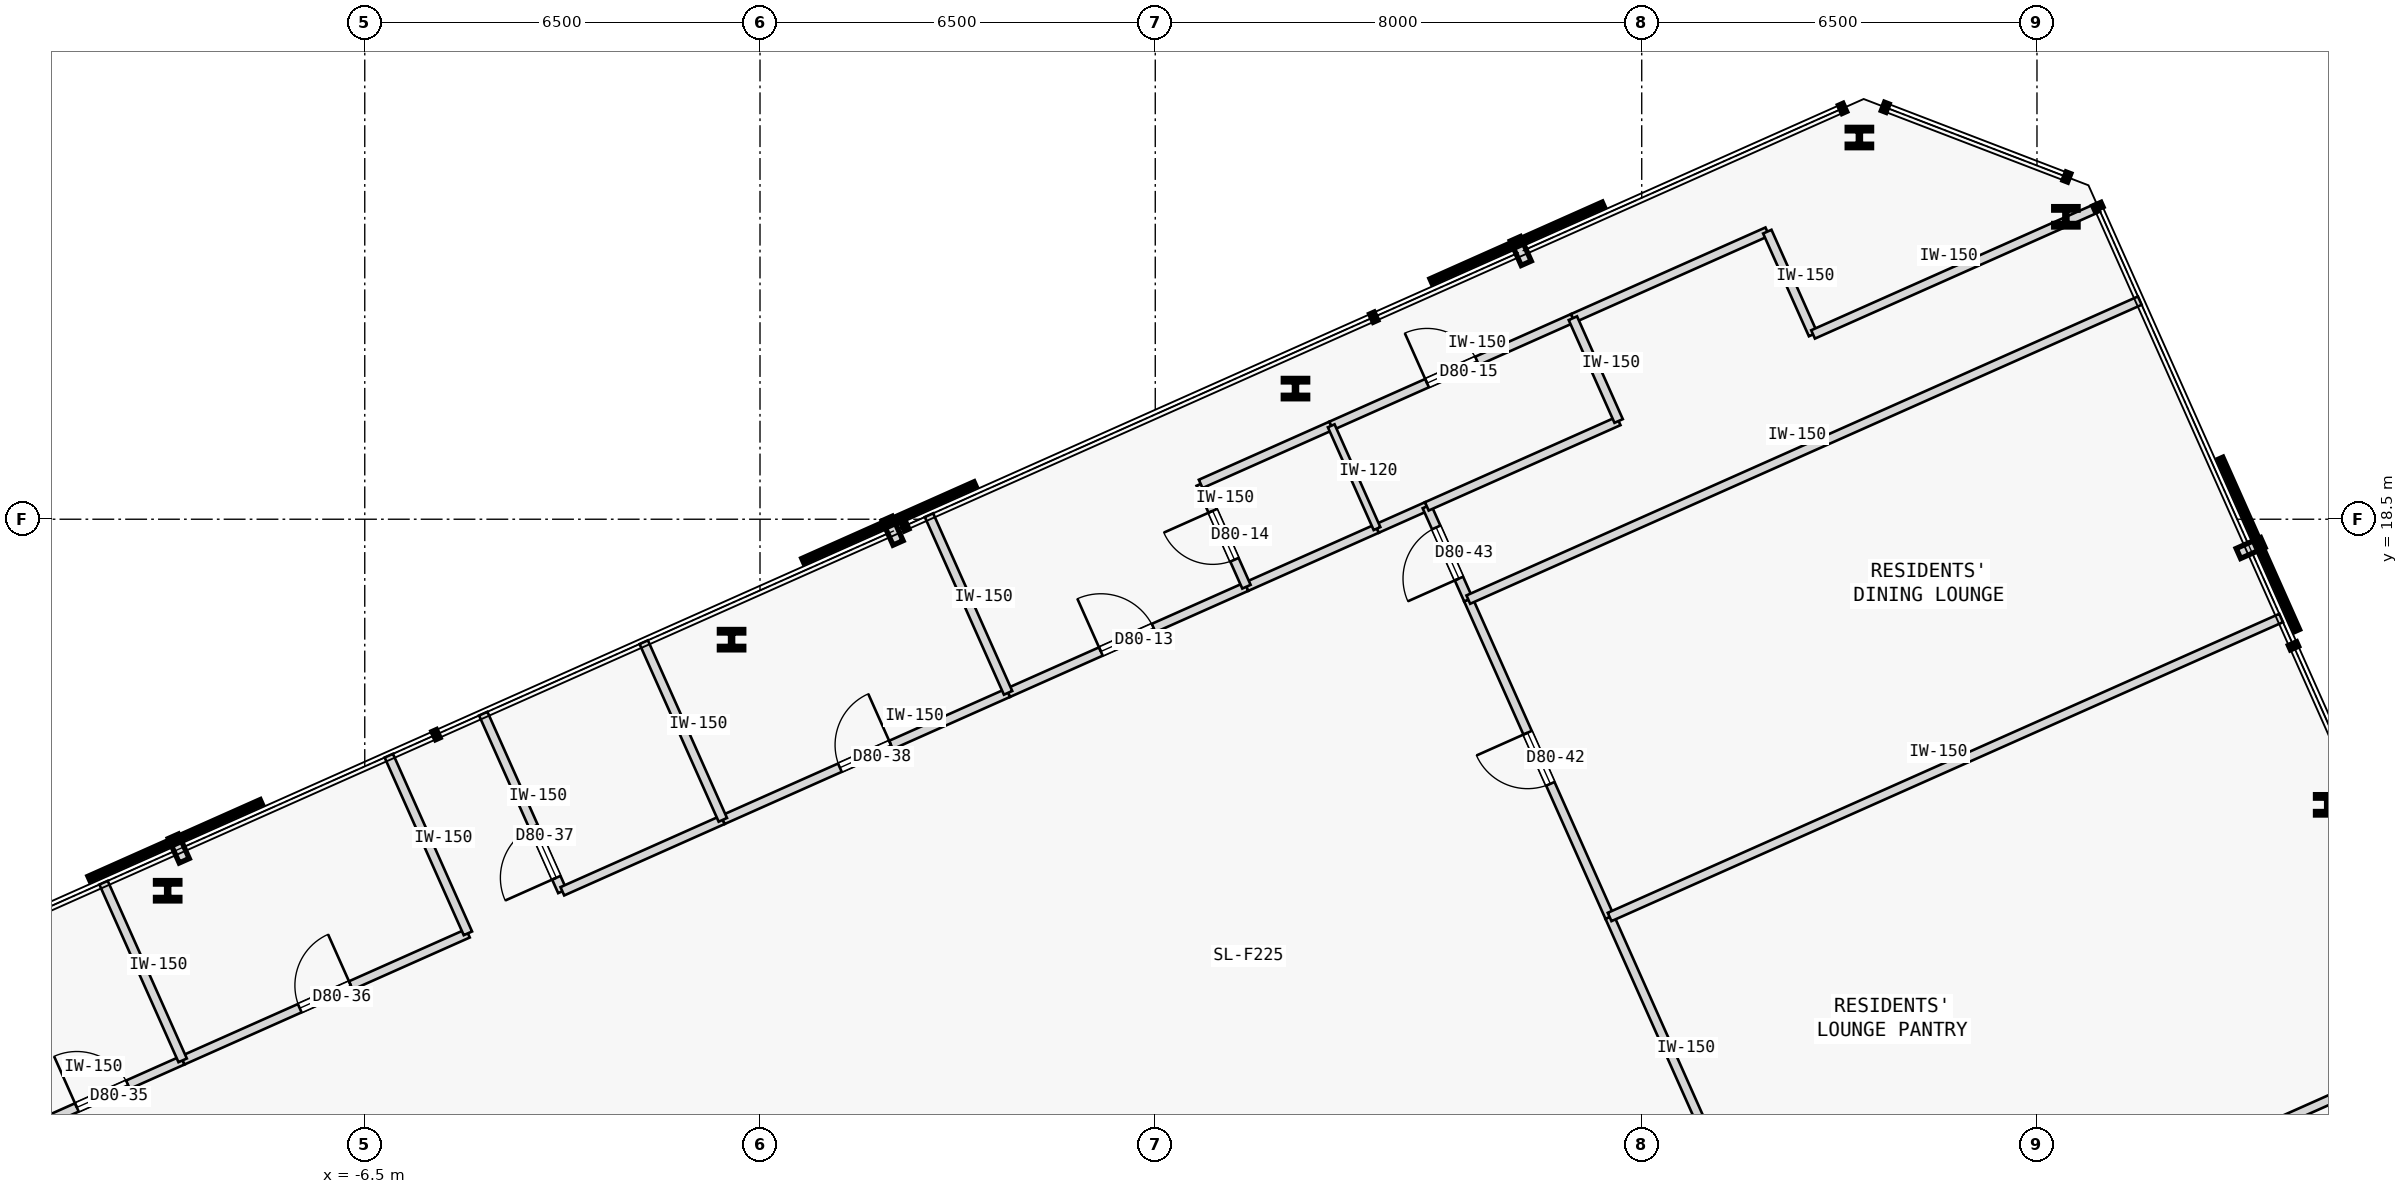
"""IFC4 building model, lengths in metres.
Left out: names, types, materials, properties, quantities, classifications, styles, units other than length and angle.
Written with IfcOpenShell. Run it as: python <this file> out.ifc"""

import sys

from ifc_helpers import new_model, si_unit, direction, frame, frame_2d, origin, origin_2d, place, context, subcontext, project, spatial, rectangle, i_section, extrude, element, fill, save


model = new_model("IFC4")
c1 = context("Model", 3, precision=1e-05, world=origin(), true_north=direction((0.0, 1.0)))
c2 = subcontext(c1, "Body", "Model", "MODEL_VIEW")
j1 = project(units=[si_unit("LENGTHUNIT", "METRE"), si_unit("PLANEANGLEUNIT", "RADIAN")], contexts=[c1])
p1 = place(None, origin())
s1 = spatial("IfcSite", under=j1, at=p1, CompositionType="ELEMENT")
p2 = place(p1, origin())
s2 = spatial("IfcBuilding", under=s1, at=p2, CompositionType="ELEMENT")
p3 = place(p2, frame((0.0, 0.0, 298.65)))
s3 = spatial("IfcBuildingStorey", under=s2, at=p3, CompositionType="ELEMENT", Elevation=298.65)
for number, where, z_axis, x_axis in (
    (1, (25.781, 13.803, 0.0), (0.0, 0.0, 1.0), (1.0, 0.0, 0.0)),
    (2, (21.476, 23.473, 0.0), (0.0, 0.0, 1.0), (1.0, 0.0, 0.0)),
    (3, (18.08, 24.777, 0.0), (0.0, 0.0, 1.0), (1.0, 0.0, 0.0)),
    (4, (8.806, 20.648, 0.0), (0.0, 0.0, 1.0), (1.0, 0.0, 0.0)),
    (5, (-0.468, 16.519, 0.0), (0.0, 0.0, 1.0), (1.0, 0.0, 0.0)),
    (6, (-9.741, 12.39, 0.0), (0.0, 0.0, 1.0), (1.0, 0.0, 0.0)),
):
    element("IfcColumn", number, at=place(p3, frame(where, z_axis=z_axis, x_axis=x_axis)), inside=s3, PredefinedType="COLUMN", context=c2, shape_type="SweptSolid", body=[
        extrude(i_section(OverallWidth=0.401, OverallDepth=0.335, WebThickness=0.036, FlangeThickness=0.058, FilletRadius=0.015, at=origin_2d()), origin(), (0.0, 0.0, 1.0), 3.35),
    ])
p4 = place(p3, frame((4.08, 15.645, 0.0), z_axis=(0.0, 0.0, 1.0), x_axis=(0.913557968328, 0.406708542452, 0.0)))
e7 = element("IfcWall", 7, at=p4, inside=s3, PredefinedType="PARTITIONING", context=c2, shape_type="SweptSolid", body=[
    extrude(rectangle(XDim=4.291, YDim=0.15, at=frame_2d((2.146, 0.0))), origin(), (0.0, 0.0, 1.0), 3.125),
])
p5 = place(p4, frame((1.67, 0.0, 0.0)))
e8 = element("IfcOpeningElement", 8, at=p5, cuts=e7, PredefinedType="OPENING", context=c2, shape_type="SweptSolid", body=[
    extrude(rectangle(XDim=0.95, YDim=2.15, at=frame_2d((0.475, 1.075))), frame((0.0, 0.085, 0.0), z_axis=(0.0, -1.0, 0.0), x_axis=(1.0, 0.0, 0.0)), (0.0, 0.0, 1.0), 0.17),
])
p6 = place(p3, frame((8.0, 17.39, 0.0), z_axis=(0.0, 0.0, 1.0), x_axis=(0.913520021435, 0.406793768926, 0.0)))
e9 = element("IfcWall", 9, at=p6, inside=s3, PredefinedType="PARTITIONING", context=c2, shape_type="SweptSolid", body=[
    extrude(rectangle(XDim=2.35, YDim=0.15, at=frame_2d((1.175, 0.0))), origin(), (0.0, 0.0, 1.0), 3.125),
])
p7 = place(p3, frame((10.146, 18.346, 0.0), z_axis=(0.0, 0.0, 1.0), x_axis=(0.9135644188, 0.406694052946, 0.0)))
e10 = element("IfcWall", 10, at=p7, inside=s3, PredefinedType="PARTITIONING", context=c2, shape_type="SweptSolid", body=[
    extrude(rectangle(XDim=0.897, YDim=0.15, at=frame_2d((0.448, 0.0))), origin(), (0.0, 0.0, 1.0), 3.125),
])
p8 = place(p3, frame((-12.134, 8.427, 0.0), z_axis=(0.0, 0.0, 1.0), x_axis=(0.913543011099, 0.406742138059, 0.0)))
e11 = element("IfcWall", 11, at=p8, inside=s3, PredefinedType="PARTITIONING", context=c2, shape_type="SweptSolid", body=[
    extrude(rectangle(XDim=2.889, YDim=0.15, at=frame_2d((1.444, 0.0))), origin(), (0.0, 0.0, 1.0), 3.125),
])
p9 = place(p8, frame((0.985, 0.0, 0.0)))
e12 = element("IfcOpeningElement", 12, at=p9, cuts=e11, PredefinedType="OPENING", context=c2, shape_type="SweptSolid", body=[
    extrude(rectangle(XDim=0.92, YDim=2.15, at=frame_2d((0.46, 1.075))), frame((0.0, 0.085, 0.0), z_axis=(0.0, -1.0, 0.0), x_axis=(1.0, 0.0, 0.0)), (0.0, 0.0, 1.0), 0.17),
])
p10 = place(p3, frame((-9.495, 9.602, 0.0), z_axis=(0.0, 0.0, 1.0), x_axis=(0.913546679905, 0.406733897819, 0.0)))
e13 = element("IfcWall", 13, at=p10, inside=s3, PredefinedType="PARTITIONING", context=c2, shape_type="SweptSolid", body=[
    extrude(rectangle(XDim=5.135, YDim=0.15, at=frame_2d((2.567, 0.0))), origin(), (0.0, 0.0, 1.0), 3.125),
])
p11 = place(p10, frame((2.107, 0.0, 0.0)))
e14 = element("IfcOpeningElement", 14, at=p11, cuts=e13, PredefinedType="OPENING", context=c2, shape_type="SweptSolid", body=[
    extrude(rectangle(XDim=0.92, YDim=2.15, at=frame_2d((0.46, 1.075))), frame((0.0, 0.085, 0.0), z_axis=(0.0, -1.0, 0.0), x_axis=(1.0, 0.0, 0.0)), (0.0, 0.0, 1.0), 0.17),
])
p12 = place(p3, frame((-4.804, 11.69, 0.0), z_axis=(0.0, 0.0, 1.0), x_axis=(-0.406761717745, 0.913534293268, 0.0)))
e15 = element("IfcWall", 15, at=p12, inside=s3, PredefinedType="PARTITIONING", context=c2, shape_type="SweptSolid", body=[
    extrude(rectangle(XDim=3.198, YDim=0.15, at=frame_2d((1.599, 0.0))), origin(), (0.0, 0.0, 1.0), 3.125),
])
p13 = place(p3, frame((-3.251, 12.382, 0.0), z_axis=(0.0, 0.0, 1.0), x_axis=(-0.406761717745, 0.913534293268, 0.0)))
e16 = element("IfcWall", 16, at=p13, inside=s3, PredefinedType="PARTITIONING", context=c2, shape_type="SweptSolid", body=[
    extrude(rectangle(XDim=3.198, YDim=0.15, at=frame_2d((1.599, 0.0))), origin(), (0.0, 0.0, 1.0), 3.125),
])
p14 = place(p13, frame((0.244, 0.0, 0.0)))
e17 = element("IfcOpeningElement", 17, at=p14, cuts=e16, PredefinedType="OPENING", context=c2, shape_type="SweptSolid", body=[
    extrude(rectangle(XDim=0.92, YDim=2.15, at=frame_2d((0.46, 1.075))), frame((0.0, 0.085, 0.0), z_axis=(0.0, -1.0, 0.0), x_axis=(1.0, 0.0, 0.0)), (0.0, 0.0, 1.0), 0.17),
])
p15 = place(p3, frame((-3.251, 12.382, 0.0), z_axis=(0.0, 0.0, 1.0), x_axis=(0.913543011099, 0.406742138059, 0.0)))
e18 = element("IfcWall", 18, at=p15, inside=s3, PredefinedType="PARTITIONING", context=c2, shape_type="SweptSolid", body=[
    extrude(rectangle(XDim=2.889, YDim=0.15, at=frame_2d((1.444, 0.0))), origin(), (0.0, 0.0, 1.0), 3.125),
])
p16 = place(p3, frame((-0.612, 13.557, 0.0), z_axis=(0.0, 0.0, 1.0), x_axis=(0.913546679905, 0.406733897819, 0.0)))
e19 = element("IfcWall", 19, at=p16, inside=s3, PredefinedType="PARTITIONING", context=c2, shape_type="SweptSolid", body=[
    extrude(rectangle(XDim=5.135, YDim=0.15, at=frame_2d((2.567, 0.0))), origin(), (0.0, 0.0, 1.0), 3.125),
])
p17 = place(p16, frame((2.107, 0.0, 0.0)))
e20 = element("IfcOpeningElement", 20, at=p17, cuts=e19, PredefinedType="OPENING", context=c2, shape_type="SweptSolid", body=[
    extrude(rectangle(XDim=0.92, YDim=2.15, at=frame_2d((0.46, 1.075))), frame((0.0, 0.085, 0.0), z_axis=(0.0, -1.0, 0.0), x_axis=(1.0, 0.0, 0.0)), (0.0, 0.0, 1.0), 0.17),
])
p18 = place(p3, frame((17.047, 5.052, 0.0), z_axis=(0.0, 0.0, 1.0), x_axis=(-0.406752543172, 0.913538378298, 0.0)))
e21 = element("IfcWall", 21, at=p18, inside=s3, PredefinedType="PARTITIONING", context=c2, shape_type="SweptSolid", body=[
    extrude(rectangle(XDim=7.561, YDim=0.15, at=frame_2d((3.781, 0.0))), origin(), (0.0, 0.0, 1.0), 3.125),
])
p19 = place(p3, frame((17.047, 5.052, 0.0), z_axis=(0.0, 0.0, 1.0), x_axis=(0.913549839503, 0.406726801113, 0.0)))
e22 = element("IfcWall", 22, at=p19, inside=s3, PredefinedType="PARTITIONING", context=c2, shape_type="SweptSolid", body=[
    extrude(rectangle(XDim=12.088, YDim=0.15, at=frame_2d((6.044, 0.0))), origin(), (0.0, 0.0, 1.0), 3.125),
])
p20 = place(p19, frame((5.584, 0.0, 0.0)))
e23 = element("IfcOpeningElement", 23, at=p20, cuts=e22, PredefinedType="OPENING", context=c2, shape_type="SweptSolid", body=[
    extrude(rectangle(XDim=0.92, YDim=2.15, at=frame_2d((0.46, 1.075))), frame((0.0, 0.085, 0.0), z_axis=(0.0, -1.0, 0.0), x_axis=(1.0, 0.0, 0.0)), (0.0, 0.0, 1.0), 0.17),
])
p21 = place(p3, frame((13.972, 11.959, 0.0), z_axis=(0.0, 0.0, 1.0), x_axis=(-0.406713331746, 0.913555836159, 0.0)))
e24 = element("IfcWall", 24, at=p21, inside=s3, PredefinedType="PARTITIONING", context=c2, shape_type="SweptSolid", body=[
    extrude(rectangle(XDim=5.713, YDim=0.15, at=frame_2d((2.856, 0.0))), origin(), (0.0, 0.0, 1.0), 3.125),
])
p22 = place(p21, frame((2.396, 0.0, 0.0)))
e25 = element("IfcOpeningElement", 25, at=p22, cuts=e24, PredefinedType="OPENING", context=c2, shape_type="SweptSolid", body=[
    extrude(rectangle(XDim=0.92, YDim=2.15, at=frame_2d((0.46, 1.075))), frame((0.0, 0.085, 0.0), z_axis=(0.0, -1.0, 0.0), x_axis=(1.0, 0.0, 0.0)), (0.0, 0.0, 1.0), 0.17),
])
p23 = place(p3, frame((11.648, 17.178, 0.0), z_axis=(0.0, 0.0, 1.0), x_axis=(-0.406786313485, 0.913523341334, 0.0)))
e26 = element("IfcWall", 26, at=p23, inside=s3, PredefinedType="PARTITIONING", context=c2, shape_type="SweptSolid", body=[
    extrude(rectangle(XDim=1.678, YDim=0.15, at=frame_2d((0.839, 0.0))), origin(), (0.0, 0.0, 1.0), 3.125),
])
p24 = place(p23, frame((0.379, 0.0, 0.0)))
e27 = element("IfcOpeningElement", 27, at=p24, cuts=e26, PredefinedType="OPENING", context=c2, shape_type="SweptSolid", body=[
    extrude(rectangle(XDim=0.92, YDim=2.15, at=frame_2d((0.46, 1.075))), frame((0.0, 0.085, 0.0), z_axis=(0.0, -1.0, 0.0), x_axis=(1.0, 0.0, 0.0)), (0.0, 0.0, 1.0), 0.17),
])
p25 = place(p3, frame((8.0, 17.39, 0.0), z_axis=(0.0, 0.0, 1.0), x_axis=(-0.406701600856, 0.913561058639, 0.0)))
e28 = element("IfcWall", 28, at=p25, inside=s3, PredefinedType="PARTITIONING", context=c2, shape_type="SweptSolid", body=[
    extrude(rectangle(XDim=1.85, YDim=0.15, at=frame_2d((0.925, 0.0))), origin(), (0.0, 0.0, 1.0), 3.125),
])
p26 = place(p25, frame((0.485, 0.0, 0.0)))
e29 = element("IfcOpeningElement", 29, at=p26, cuts=e28, PredefinedType="OPENING", context=c2, shape_type="SweptSolid", body=[
    extrude(rectangle(XDim=0.88, YDim=2.15, at=frame_2d((0.44, 1.075))), frame((0.0, 0.085, 0.0), z_axis=(0.0, -1.0, 0.0), x_axis=(1.0, 0.0, 0.0)), (0.0, 0.0, 1.0), 0.17),
])
p27 = place(p3, frame((7.247, 19.081, 0.0), z_axis=(0.0, 0.0, 1.0), x_axis=(0.913541436194, 0.406745675276, 0.0)))
e30 = element("IfcWall", 30, at=p27, inside=s3, PredefinedType="PARTITIONING", context=c2, shape_type="SweptSolid", body=[
    extrude(rectangle(XDim=2.35, YDim=0.15, at=frame_2d((1.175, 0.0))), origin(), (0.0, 0.0, 1.0), 3.125),
])
p28 = place(p3, frame((9.394, 20.036, 0.0), z_axis=(0.0, 0.0, 1.0), x_axis=(0.913554477336, 0.406716383908, 0.0)))
e31 = element("IfcWall", 31, at=p28, inside=s3, PredefinedType="PARTITIONING", context=c2, shape_type="SweptSolid", body=[
    extrude(rectangle(XDim=4.35, YDim=0.15, at=frame_2d((2.175, 0.0))), origin(), (0.0, 0.0, 1.0), 3.125),
])
p29 = place(p28, frame((1.725, 0.0, 0.0)))
e32 = element("IfcOpeningElement", 32, at=p29, cuts=e31, PredefinedType="OPENING", context=c2, shape_type="SweptSolid", body=[
    extrude(rectangle(XDim=0.9, YDim=2.15, at=frame_2d((0.45, 1.075))), frame((0.0, 0.085, 0.0), z_axis=(0.0, -1.0, 0.0), x_axis=(1.0, 0.0, 0.0)), (0.0, 0.0, 1.0), 0.17),
])
p30 = place(p3, frame((4.08, 15.645, 0.0), z_axis=(0.0, 0.0, 1.0), x_axis=(-0.406761717745, 0.913534293268, 0.0)))
e33 = element("IfcWall", 33, at=p30, inside=s3, PredefinedType="PARTITIONING", context=c2, shape_type="SweptSolid", body=[
    extrude(rectangle(XDim=3.198, YDim=0.15, at=frame_2d((1.599, 0.0))), origin(), (0.0, 0.0, 1.0), 3.125),
])
p31 = place(p3, frame((13.368, 21.806, 0.0), z_axis=(0.0, 0.0, 1.0), x_axis=(0.913538066796, 0.406753242783, 0.0)))
e34 = element("IfcWall", 34, at=p31, inside=s3, PredefinedType="PARTITIONING", context=c2, shape_type="SweptSolid", body=[
    extrude(rectangle(XDim=3.5, YDim=0.15, at=frame_2d((1.75, 0.0))), origin(), (0.0, 0.0, 1.0), 3.125),
])
p32 = place(p3, frame((17.318, 21.539, 0.0), z_axis=(0.0, 0.0, 1.0), x_axis=(-0.406750635596, 0.913539227643, 0.0)))
e35 = element("IfcWall", 35, at=p32, inside=s3, PredefinedType="PARTITIONING", context=c2, shape_type="SweptSolid", body=[
    extrude(rectangle(XDim=1.85, YDim=0.15, at=frame_2d((0.925, 0.0))), origin(), (0.0, 0.0, 1.0), 3.125),
])
p33 = place(p3, frame((17.318, 21.539, 0.0), z_axis=(0.0, 0.0, 1.0), x_axis=(0.91356434511, 0.406694218479, 0.0)))
e36 = element("IfcWall", 36, at=p33, inside=s3, PredefinedType="PARTITIONING", context=c2, shape_type="SweptSolid", body=[
    extrude(rectangle(XDim=5.135, YDim=0.15, at=frame_2d((2.567, 0.0))), origin(), (0.0, 0.0, 1.0), 3.125),
])
p34 = place(p3, frame((10.146, 18.346, 0.0), z_axis=(0.0, 0.0, 1.0), x_axis=(-0.406860767979, 0.913490183571, 0.0)))
e37 = element("IfcWall", 37, at=p34, inside=s3, PredefinedType="PARTITIONING", context=c2, shape_type="SweptSolid", body=[
    extrude(rectangle(XDim=1.85, YDim=0.12, at=frame_2d((0.925, 0.0))), origin(), (0.0, 0.0, 1.0), 3.125),
])
p35 = place(p3, frame((10.966, 18.711, 0.0), z_axis=(0.0, 0.0, 1.0), x_axis=(0.913540199258, 0.406748453396, 0.0)))
e38 = element("IfcWall", 38, at=p35, inside=s3, PredefinedType="PARTITIONING", context=c2, shape_type="SweptSolid", body=[
    extrude(rectangle(XDim=3.453, YDim=0.15, at=frame_2d((1.727, 0.0))), origin(), (0.0, 0.0, 1.0), 3.125),
])
p36 = place(p3, frame((14.12, 20.116, 0.0), z_axis=(0.0, 0.0, 1.0), x_axis=(-0.406750635596, 0.913539227643, 0.0)))
e39 = element("IfcWall", 39, at=p36, inside=s3, PredefinedType="PARTITIONING", context=c2, shape_type="SweptSolid", body=[
    extrude(rectangle(XDim=1.85, YDim=0.15, at=frame_2d((0.925, 0.0))), origin(), (0.0, 0.0, 1.0), 3.125),
])
for number, where, z_axis, x_axis in (
    (40, (-9.495, 9.602, 0.0), (0.0, 0.0, 1.0), (-0.407, 0.914, 0.0)),
    (41, (-0.612, 13.557, 0.0), (0.0, 0.0, 1.0), (-0.407, 0.914, 0.0)),
):
    element("IfcWall", number, at=place(p3, frame(where, z_axis=z_axis, x_axis=x_axis)), inside=s3, PredefinedType="PARTITIONING", context=c2, shape_type="SweptSolid", body=[
        extrude(rectangle(XDim=3.198, YDim=0.15, at=frame_2d((1.599, 0.0))), origin(), (0.0, 0.0, 1.0), 3.125),
    ])
p37 = place(p3, frame((13.972, 11.959, 0.0), z_axis=(0.0, 0.0, 1.0), x_axis=(0.913549839503, 0.406726801113, 0.0)))
e42 = element("IfcWall", 42, at=p37, inside=s3, PredefinedType="PARTITIONING", context=c2, shape_type="SweptSolid", body=[
    extrude(rectangle(XDim=12.088, YDim=0.15, at=frame_2d((6.044, 0.0))), origin(), (0.0, 0.0, 1.0), 3.125),
])
p38 = place(p3, frame((11.648, 17.178, 0.0), z_axis=(0.0, 0.0, 1.0), x_axis=(0.913542334914, 0.406743656766, 0.0)))
e43 = element("IfcWall", 43, at=p38, inside=s3, PredefinedType="PARTITIONING", context=c2, shape_type="SweptSolid", body=[
    extrude(rectangle(XDim=12.088, YDim=0.15, at=frame_2d((6.044, 0.0))), origin(), (0.0, 0.0, 1.0), 3.125),
])
p39 = place(p5, origin())
e44 = element("IfcDoor", 44, at=p39, inside=s3, OperationType="SINGLE_SWING_LEFT", PredefinedType="DOOR", context=c2, shape_type="SweptSolid", body=[
    extrude(rectangle(XDim=0.95, YDim=2.15, at=frame_2d((0.475, 1.075))), frame((0.0, 0.025, 0.0), z_axis=(0.0, -1.0, 0.0), x_axis=(1.0, 0.0, 0.0)), (0.0, 0.0, 1.0), 0.05),
])
fill(e8, e44)
p40 = place(p26, origin())
e45 = element("IfcDoor", 45, at=p40, inside=s3, OperationType="SINGLE_SWING_RIGHT", PredefinedType="DOOR", context=c2, shape_type="SweptSolid", body=[
    extrude(rectangle(XDim=0.88, YDim=2.15, at=frame_2d((0.44, 1.075))), frame((0.0, 0.025, 0.0), z_axis=(0.0, -1.0, 0.0), x_axis=(1.0, 0.0, 0.0)), (0.0, 0.0, 1.0), 0.05),
])
fill(e29, e45)
p41 = place(p29, origin())
e46 = element("IfcDoor", 46, at=p41, inside=s3, OperationType="SINGLE_SWING_LEFT", PredefinedType="DOOR", context=c2, shape_type="SweptSolid", body=[
    extrude(rectangle(XDim=0.9, YDim=2.15, at=frame_2d((0.45, 1.075))), frame((0.0, 0.025, 0.0), z_axis=(0.0, -1.0, 0.0), x_axis=(1.0, 0.0, 0.0)), (0.0, 0.0, 1.0), 0.05),
])
fill(e32, e46)
p42 = place(p9, origin())
e47 = element("IfcDoor", 47, at=p42, inside=s3, OperationType="SINGLE_SWING_LEFT", PredefinedType="DOOR", context=c2, shape_type="SweptSolid", body=[
    extrude(rectangle(XDim=0.92, YDim=2.15, at=frame_2d((0.46, 1.075))), frame((0.0, 0.025, 0.0), z_axis=(0.0, -1.0, 0.0), x_axis=(1.0, 0.0, 0.0)), (0.0, 0.0, 1.0), 0.05),
])
fill(e12, e47)
p43 = place(p11, origin())
e48 = element("IfcDoor", 48, at=p43, inside=s3, OperationType="SINGLE_SWING_RIGHT", PredefinedType="DOOR", context=c2, shape_type="SweptSolid", body=[
    extrude(rectangle(XDim=0.92, YDim=2.15, at=frame_2d((0.46, 1.075))), frame((0.0, 0.025, 0.0), z_axis=(0.0, -1.0, 0.0), x_axis=(1.0, 0.0, 0.0)), (0.0, 0.0, 1.0), 0.05),
])
fill(e14, e48)
p44 = place(p14, origin())
e49 = element("IfcDoor", 49, at=p44, inside=s3, OperationType="SINGLE_SWING_LEFT", PredefinedType="DOOR", context=c2, shape_type="SweptSolid", body=[
    extrude(rectangle(XDim=0.92, YDim=2.15, at=frame_2d((0.46, 1.075))), frame((0.0, 0.025, 0.0), z_axis=(0.0, -1.0, 0.0), x_axis=(1.0, 0.0, 0.0)), (0.0, 0.0, 1.0), 0.05),
])
fill(e17, e49)
p45 = place(p17, origin())
e50 = element("IfcDoor", 50, at=p45, inside=s3, OperationType="SINGLE_SWING_RIGHT", PredefinedType="DOOR", context=c2, shape_type="SweptSolid", body=[
    extrude(rectangle(XDim=0.92, YDim=2.15, at=frame_2d((0.46, 1.075))), frame((0.0, 0.025, 0.0), z_axis=(0.0, -1.0, 0.0), x_axis=(1.0, 0.0, 0.0)), (0.0, 0.0, 1.0), 0.05),
])
fill(e20, e50)
p46 = place(p22, origin())
e51 = element("IfcDoor", 51, at=p46, inside=s3, OperationType="SINGLE_SWING_RIGHT", PredefinedType="DOOR", context=c2, shape_type="SweptSolid", body=[
    extrude(rectangle(XDim=0.92, YDim=2.15, at=frame_2d((0.46, 1.075))), frame((0.0, 0.025, 0.0), z_axis=(0.0, -1.0, 0.0), x_axis=(1.0, 0.0, 0.0)), (0.0, 0.0, 1.0), 0.05),
])
fill(e25, e51)
p47 = place(p24, origin())
e52 = element("IfcDoor", 52, at=p47, inside=s3, OperationType="SINGLE_SWING_LEFT", PredefinedType="DOOR", context=c2, shape_type="SweptSolid", body=[
    extrude(rectangle(XDim=0.92, YDim=2.15, at=frame_2d((0.46, 1.075))), frame((0.0, 0.025, 0.0), z_axis=(0.0, -1.0, 0.0), x_axis=(1.0, 0.0, 0.0)), (0.0, 0.0, 1.0), 0.05),
])
fill(e27, e52)
save(model, sys.argv[1])
